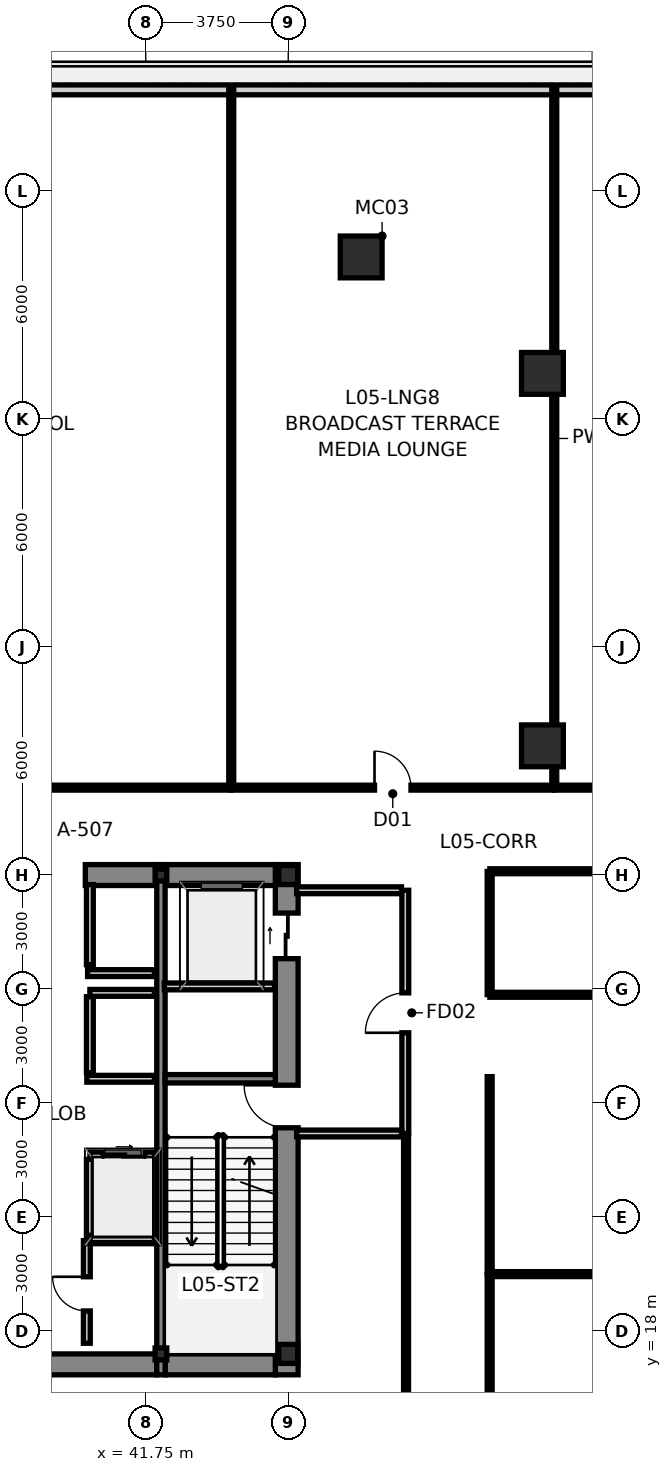
"""IFC4 building model, lengths in metres.
Left out: names, types, materials, properties, quantities, classifications, styles, units other than length and angle.
Written with IfcOpenShell. Run it as: python <this file> out.ifc"""

import sys

from ifc_helpers import new_model, si_unit, direction, frame, frame_2d, origin, origin_2d, place, context, subcontext, project, spatial, rectangle, hollow_rectangle, i_section, extrude, source, transform, mapped, element, fill, save


model = new_model("IFC4")
c1 = context("Model", 3, precision=1e-05, world=origin(), true_north=direction((0.0, 1.0)))
c2 = subcontext(c1, "Body", "Model", "MODEL_VIEW")
j1 = project(units=[si_unit("LENGTHUNIT", "METRE"), si_unit("PLANEANGLEUNIT", "RADIAN")], contexts=[c1])
p1 = place(None, origin())
s1 = spatial("IfcSite", under=j1, at=p1, CompositionType="ELEMENT")
p2 = place(p1, origin())
s2 = spatial("IfcBuilding", under=s1, at=p2, CompositionType="ELEMENT")
p3 = place(p2, frame((0.0, 0.0, 23.1)))
s3 = spatial("IfcBuildingStorey", under=s2, at=p3, CompositionType="ELEMENT", Elevation=23.1)
m1 = source(origin(), c2, "Body", "SweptSolid", [
    extrude(i_section(OverallWidth=0.5, OverallDepth=0.5, WebThickness=0.028, FlangeThickness=0.04, at=origin_2d()), origin(), (0.0, 0.0, 1.0), 4.5),
])
for number, where, z_axis, x_axis in (
    (1, (45.5, 17.4, 0.0), (0.0, 0.0, 1.0), (1.0, 0.0, 0.0)),
    (2, (45.5, 30.0, 0.0), (0.0, 0.0, 1.0), (1.0, 0.0, 0.0)),
):
    element("IfcColumn", number, at=place(p3, frame(where, z_axis=z_axis, x_axis=x_axis)), inside=s3, PredefinedType="COLUMN", context=c2, shape_type="MappedRepresentation", body=[
        mapped(m1, transform((0.0, 0.0, 0.0), scale=1.0)),
    ])
m2 = source(origin(), c2, "Body", "SweptSolid", [
    extrude(i_section(OverallWidth=0.307, OverallDepth=0.315, WebThickness=0.012, FlangeThickness=0.019, at=origin_2d()), origin(), (0.0, 0.0, 1.0), 4.5),
])
for number, where, z_axis, x_axis in (
    (3, (42.15, 17.4, 0.0), (0.0, 0.0, 1.0), (1.0, 0.0, 0.0)),
    (4, (42.15, 30.0, 0.0), (0.0, 0.0, 1.0), (1.0, 0.0, 0.0)),
):
    element("IfcColumn", number, at=place(p3, frame(where, z_axis=z_axis, x_axis=x_axis)), inside=s3, PredefinedType="COLUMN", context=c2, shape_type="MappedRepresentation", body=[
        mapped(m2, transform((0.0, 0.0, 0.0), scale=1.0)),
    ])
p4 = place(p3, frame((45.46, 16.85, 0.0), z_axis=(0.0, 0.0, 1.0), x_axis=(0.0, 1.0, 0.0)))
e5 = element("IfcWall", 5, at=p4, inside=s3, PredefinedType="SHEAR", context=c2, shape_type="SweptSolid", body=[
    extrude(rectangle(XDim=13.425, YDim=0.6, at=frame_2d((6.712, 0.0))), origin(), (0.0, 0.0, 1.0), 4.5),
])
p5 = place(p4, frame((6.5, 0.0, 0.0)))
e6 = element("IfcOpeningElement", 6, at=p5, cuts=e5, PredefinedType="OPENING", context=c2, shape_type="SweptSolid", body=[
    extrude(rectangle(XDim=1.12, YDim=2.15, at=frame_2d((0.56, 1.075))), frame((0.0, 0.312, 0.0), z_axis=(0.0, -1.0, 0.0), x_axis=(1.0, 0.0, 0.0)), (0.0, 0.0, 1.0), 0.624),
])
p6 = place(p4, frame((10.95, 0.0, 0.0)))
e7 = element("IfcOpeningElement", 7, at=p6, cuts=e5, PredefinedType="OPENING", context=c2, shape_type="SweptSolid", body=[
    extrude(rectangle(XDim=1.2, YDim=2.2, at=frame_2d((0.6, 1.1))), frame((0.0, 0.312, 0.0), z_axis=(0.0, -1.0, 0.0), x_axis=(1.0, 0.0, 0.0)), (0.0, 0.0, 1.0), 0.624),
])
p7 = place(p3, frame((33.96, 17.125, 0.0), z_axis=(0.0, 0.0, 1.0), x_axis=(1.0, 0.0, 0.0)))
e8 = element("IfcWall", 8, at=p7, inside=s3, PredefinedType="SHEAR", context=c2, shape_type="SweptSolid", body=[
    extrude(rectangle(XDim=8.08, YDim=0.55, at=frame_2d((4.04, 0.0))), origin(), (0.0, 0.0, 1.0), 4.5),
])
p8 = place(p3, frame((42.26, 17.125, 0.0), z_axis=(0.0, 0.0, 1.0), x_axis=(1.0, 0.0, 0.0)))
e9 = element("IfcWall", 9, at=p8, inside=s3, PredefinedType="SHEAR", context=c2, shape_type="SweptSolid", body=[
    extrude(rectangle(XDim=2.9, YDim=0.55, at=frame_2d((1.45, 0.0))), origin(), (0.0, 0.0, 1.0), 4.5),
])
p9 = place(p3, frame((40.16, 30.0, 0.0), z_axis=(0.0, 0.0, 1.0), x_axis=(1.0, 0.0, 0.0)))
e10 = element("IfcWall", 10, at=p9, inside=s3, PredefinedType="SHEAR", context=c2, shape_type="SweptSolid", body=[
    extrude(rectangle(XDim=1.88, YDim=0.55, at=frame_2d((0.94, 0.0))), origin(), (0.0, 0.0, 1.0), 4.5),
])
p10 = place(p3, frame((42.26, 30.0, 0.0), z_axis=(0.0, 0.0, 1.0), x_axis=(1.0, 0.0, 0.0)))
e11 = element("IfcWall", 11, at=p10, inside=s3, PredefinedType="SHEAR", context=c2, shape_type="SweptSolid", body=[
    extrude(rectangle(XDim=2.9, YDim=0.55, at=frame_2d((1.45, 0.0))), origin(), (0.0, 0.0, 1.0), 4.5),
])
p11 = place(p3, frame((42.15, 16.85, 0.0), z_axis=(0.0, 0.0, 1.0), x_axis=(0.0, 1.0, 0.0)))
e12 = element("IfcWall", 12, at=p11, inside=s3, PredefinedType="SHEAR", context=c2, shape_type="SweptSolid", body=[
    extrude(rectangle(XDim=13.425, YDim=0.22, at=frame_2d((6.712, 0.0))), origin(), (0.0, 0.0, 1.0), 4.5),
])
p12 = place(p3, frame((42.26, 24.64, 0.0), z_axis=(0.0, 0.0, 1.0), x_axis=(1.0, 0.0, 0.0)))
e13 = element("IfcWall", 13, at=p12, inside=s3, PredefinedType="SHEAR", context=c2, shape_type="SweptSolid", body=[
    extrude(rectangle(XDim=2.9, YDim=0.22, at=frame_2d((1.45, 0.0))), origin(), (0.0, 0.0, 1.0), 4.5),
])
m3 = source(origin(), c2, "Body", "SweptSolid", [
    extrude(hollow_rectangle(XDim=1.1, YDim=1.1, WallThickness=0.06, at=origin_2d()), origin(), (0.0, 0.0, 1.0), 4.501),
])
p13 = place(p3, frame((47.419, 46.264, 0.0), z_axis=(-0.023864693146, 0.001735614047, 0.999713691046), x_axis=(-0.072535695779, -0.997365816959, 0.0)))
e14 = element("IfcColumn", 14, at=p13, inside=s3, PredefinedType="COLUMN", context=c2, shape_type="MappedRepresentation", body=[
    mapped(m3, transform((0.0, 0.0, 0.0), scale=1.0)),
])
m4 = source(origin(), c2, "Body", "SweptSolid", [
    extrude(hollow_rectangle(XDim=1.1, YDim=1.1, WallThickness=0.06, at=origin_2d()), origin(), (0.0, 0.0, 1.0), 4.25),
])
for number, where, z_axis, x_axis in (
    (15, (52.189, 33.4, 0.0), (0.0, 0.0, 1.0), (1.0, 0.0, 0.0)),
    (16, (52.189, 43.2, 0.0), (0.0, 0.0, 1.0), (1.0, 0.0, 0.0)),
):
    element("IfcColumn", number, at=place(p3, frame(where, z_axis=z_axis, x_axis=x_axis)), inside=s3, PredefinedType="COLUMN", context=c2, shape_type="MappedRepresentation", body=[
        mapped(m4, transform((0.0, 0.0, 0.0), scale=1.0)),
    ])
p14 = place(p3, frame((13.061, 50.66, 0.0), z_axis=(0.0, 0.0, 1.0), x_axis=(1.0, 0.0, 0.0)))
e17 = element("IfcWall", 17, at=p14, inside=s3, PredefinedType="STANDARD", context=c2, shape_type="SweptSolid", body=[
    extrude(rectangle(XDim=49.878, YDim=0.26, at=frame_2d((24.939, 0.0))), origin(), (0.0, 0.0, 1.0), 4.25),
])
p15 = place(p3, frame((40.28, 22.62, 0.0), z_axis=(0.0, 0.0, 1.0), x_axis=(1.0, 0.0, 0.0)))
e18 = element("IfcWall", 18, at=p15, inside=s3, PredefinedType="PARTITIONING", context=c2, shape_type="SweptSolid", body=[
    extrude(rectangle(XDim=1.7, YDim=0.18, at=frame_2d((0.85, 0.0))), origin(), (0.0, 0.0, 1.0), 4.25),
])
p16 = place(p15, frame((0.35, 0.0, 0.0)))
e19 = element("IfcOpeningElement", 19, at=p16, cuts=e18, PredefinedType="OPENING", context=c2, shape_type="SweptSolid", body=[
    extrude(rectangle(XDim=1.1, YDim=2.2, at=frame_2d((0.55, 1.1))), frame((0.0, 0.102, 0.0), z_axis=(0.0, -1.0, 0.0), x_axis=(1.0, 0.0, 0.0)), (0.0, 0.0, 1.0), 0.204),
])
p17 = place(p3, frame((40.28, 20.52, 0.0), z_axis=(0.0, 0.0, 1.0), x_axis=(0.0, 1.0, 0.0)))
e20 = element("IfcWall", 20, at=p17, inside=s3, PredefinedType="PARTITIONING", context=c2, shape_type="SweptSolid", body=[
    extrude(rectangle(XDim=2.0, YDim=0.18, at=frame_2d((1.0, 0.0))), origin(), (0.0, 0.0, 1.0), 4.25),
])
p18 = place(p3, frame((40.28, 26.9, 0.0), z_axis=(0.0, 0.0, 1.0), x_axis=(1.0, 0.0, 0.0)))
e21 = element("IfcWall", 21, at=p18, inside=s3, PredefinedType="PARTITIONING", context=c2, shape_type="SweptSolid", body=[
    extrude(rectangle(XDim=1.7, YDim=0.18, at=frame_2d((0.85, 0.0))), origin(), (0.0, 0.0, 1.0), 4.25),
])
p19 = place(p3, frame((40.28, 24.8, 0.0), z_axis=(0.0, 0.0, 1.0), x_axis=(0.0, 1.0, 0.0)))
e22 = element("IfcWall", 22, at=p19, inside=s3, PredefinedType="PARTITIONING", context=c2, shape_type="SweptSolid", body=[
    extrude(rectangle(XDim=2.0, YDim=0.18, at=frame_2d((1.0, 0.0))), origin(), (0.0, 0.0, 1.0), 4.25),
])
p20 = place(p3, frame((40.2, 24.64, 0.0), z_axis=(0.0, 0.0, 1.0), x_axis=(1.0, 0.0, 0.0)))
e23 = element("IfcWall", 23, at=p20, inside=s3, PredefinedType="PARTITIONING", context=c2, shape_type="SweptSolid", body=[
    extrude(rectangle(XDim=1.78, YDim=0.18, at=frame_2d((0.89, 0.0))), origin(), (0.0, 0.0, 1.0), 4.25),
])
p21 = place(p3, frame((40.22, 27.42, 0.0), z_axis=(0.0, 0.0, 1.0), x_axis=(1.0, 0.0, 0.0)))
e24 = element("IfcWall", 24, at=p21, inside=s3, PredefinedType="PARTITIONING", context=c2, shape_type="SweptSolid", body=[
    extrude(rectangle(XDim=1.76, YDim=0.18, at=frame_2d((0.88, 0.0))), origin(), (0.0, 0.0, 1.0), 4.25),
])
p22 = place(p3, frame((40.28, 27.64, 0.0), z_axis=(0.0, 0.0, 1.0), x_axis=(0.0, 1.0, 0.0)))
e25 = element("IfcWall", 25, at=p22, inside=s3, PredefinedType="PARTITIONING", context=c2, shape_type="SweptSolid", body=[
    extrude(rectangle(XDim=2.11, YDim=0.18, at=frame_2d((1.055, 0.0))), origin(), (0.0, 0.0, 1.0), 4.25),
])
p23 = place(p3, frame((48.58, 23.2, 0.0), z_axis=(0.0, 0.0, 1.0), x_axis=(0.0, 1.0, 0.0)))
e26 = element("IfcWall", 26, at=p23, inside=s3, PredefinedType="PARTITIONING", context=c2, shape_type="SweptSolid", body=[
    extrude(rectangle(XDim=6.4, YDim=0.18, at=frame_2d((3.2, 0.0))), origin(), (0.0, 0.0, 1.0), 4.25),
])
p24 = place(p23, frame((2.65, 0.0, 0.0)))
e27 = element("IfcOpeningElement", 27, at=p24, cuts=e26, PredefinedType="OPENING", context=c2, shape_type="SweptSolid", body=[
    extrude(rectangle(XDim=1.05, YDim=2.15, at=frame_2d((0.525, 1.075))), frame((0.0, 0.102, 0.0), z_axis=(0.0, -1.0, 0.0), x_axis=(1.0, 0.0, 0.0)), (0.0, 0.0, 1.0), 0.204),
])
p25 = place(p3, frame((45.72, 23.2, 0.0), z_axis=(0.0, 0.0, 1.0), x_axis=(1.0, 0.0, 0.0)))
e28 = element("IfcWall", 28, at=p25, inside=s3, PredefinedType="PARTITIONING", context=c2, shape_type="SweptSolid", body=[
    extrude(rectangle(XDim=2.76, YDim=0.18, at=frame_2d((1.38, 0.0))), origin(), (0.0, 0.0, 1.0), 4.25),
])
p26 = place(p3, frame((45.72, 29.6, 0.0), z_axis=(0.0, 0.0, 1.0), x_axis=(1.0, 0.0, 0.0)))
e29 = element("IfcWall", 29, at=p26, inside=s3, PredefinedType="PARTITIONING", context=c2, shape_type="SweptSolid", body=[
    extrude(rectangle(XDim=2.76, YDim=0.18, at=frame_2d((1.38, 0.0))), origin(), (0.0, 0.0, 1.0), 3.623),
])
p27 = place(p3, frame((42.24, 27.07, 0.0), z_axis=(0.0, 0.0, 1.0), x_axis=(1.0, 0.0, 0.0)))
e30 = element("IfcWall", 30, at=p27, inside=s3, PredefinedType="PARTITIONING", context=c2, shape_type="SweptSolid", body=[
    extrude(rectangle(XDim=2.9, YDim=0.18, at=frame_2d((1.45, 0.0))), origin(), (0.0, 0.0, 1.0), 4.25),
])
p28 = place(p3, frame((40.22, 20.42, 0.0), z_axis=(0.0, 0.0, 1.0), x_axis=(1.0, 0.0, 0.0)))
e31 = element("IfcWall", 31, at=p28, inside=s3, PredefinedType="PARTITIONING", context=c2, shape_type="SweptSolid", body=[
    extrude(rectangle(XDim=1.76, YDim=0.18, at=frame_2d((0.88, 0.0))), origin(), (0.0, 0.0, 1.0), 4.25),
])
p29 = place(p3, frame((40.2, 17.68, 0.0), z_axis=(0.0, 0.0, 1.0), x_axis=(0.0, 1.0, 0.0)))
e32 = element("IfcWall", 32, at=p29, inside=s3, PredefinedType="PARTITIONING", context=c2, shape_type="SweptSolid", body=[
    extrude(rectangle(XDim=2.7, YDim=0.18, at=frame_2d((1.35, 0.0))), origin(), (0.0, 0.0, 1.0), 4.25),
])
p30 = place(p29, frame((0.85, 0.0, 0.0)))
e33 = element("IfcOpeningElement", 33, at=p30, cuts=e32, PredefinedType="OPENING", context=c2, shape_type="SweptSolid", body=[
    extrude(rectangle(XDim=0.9, YDim=2.1, at=frame_2d((0.45, 1.05))), frame((0.0, 0.102, 0.0), z_axis=(0.0, -1.0, 0.0), x_axis=(1.0, 0.0, 0.0)), (0.0, 0.0, 1.0), 0.204),
])
p31 = place(p3, frame((52.5, 32.305, 0.0), z_axis=(0.0, 0.0, 1.0), x_axis=(0.0, 1.0, 0.0)))
e34 = element("IfcWall", 34, at=p31, inside=s3, PredefinedType="PARTITIONING", context=c2, shape_type="SweptSolid", body=[
    extrude(rectangle(XDim=18.365, YDim=0.13, at=frame_2d((9.183, 0.0))), origin(), (0.0, 0.0, 1.0), 2.435),
])
p32 = place(p3, frame((44.0, 32.305, 0.0), z_axis=(0.0, 0.0, 1.0), x_axis=(0.0, 1.0, 0.0)))
e35 = element("IfcWall", 35, at=p32, inside=s3, PredefinedType="PARTITIONING", context=c2, shape_type="SweptSolid", body=[
    extrude(rectangle(XDim=18.365, YDim=0.13, at=frame_2d((9.183, 0.0))), origin(), (0.0, 0.0, 1.0), 4.25),
])
p33 = place(p3, frame((26.205, 32.3, 0.0), z_axis=(0.0, 0.0, 1.0), x_axis=(1.0, 0.0, 0.0)))
e36 = element("IfcWall", 36, at=p33, inside=s3, PredefinedType="PARTITIONING", context=c2, shape_type="SweptSolid", body=[
    extrude(rectangle(XDim=17.79, YDim=0.13, at=frame_2d((8.895, 0.0))), origin(), (0.0, 0.0, 1.0), 4.25),
])
p34 = place(p33, frame((8.415, 0.0, 0.0)))
e37 = element("IfcOpeningElement", 37, at=p34, cuts=e36, PredefinedType="OPENING", context=c2, shape_type="SweptSolid", body=[
    extrude(rectangle(XDim=0.96, YDim=2.15, at=frame_2d((0.48, 1.075))), frame((0.0, 0.077, 0.0), z_axis=(0.0, -1.0, 0.0), x_axis=(1.0, 0.0, 0.0)), (0.0, 0.0, 1.0), 0.154),
])
p35 = place(p3, frame((61.495, 30.1, 0.0), z_axis=(0.0, 0.0, 1.0), x_axis=(-1.0, 0.0, 0.0)))
e38 = element("IfcWall", 38, at=p35, inside=s3, PredefinedType="PARTITIONING", context=c2, shape_type="SweptSolid", body=[
    extrude(rectangle(XDim=10.69, YDim=0.13, at=frame_2d((5.345, 0.0))), origin(), (0.0, 0.0, 1.0), 3.623),
])
p36 = place(p35, frame((5.4, 0.0, 0.0)))
e39 = element("IfcOpeningElement", 39, at=p36, cuts=e38, PredefinedType="OPENING", context=c2, shape_type="SweptSolid", body=[
    extrude(rectangle(XDim=0.96, YDim=2.15, at=frame_2d((0.48, 1.075))), frame((0.0, 0.077, 0.0), z_axis=(0.0, -1.0, 0.0), x_axis=(1.0, 0.0, 0.0)), (0.0, 0.0, 1.0), 0.154),
])
p37 = place(p3, frame((52.505, 32.3, 0.0), z_axis=(0.0, 0.0, 1.0), x_axis=(1.0, 0.0, 0.0)))
e40 = element("IfcWall", 40, at=p37, inside=s3, PredefinedType="PARTITIONING", context=c2, shape_type="SweptSolid", body=[
    extrude(rectangle(XDim=8.99, YDim=0.13, at=frame_2d((4.495, 0.0))), origin(), (0.0, 0.0, 1.0), 4.25),
])
p38 = place(p3, frame((48.6, 14.355, 0.0), z_axis=(0.0, 0.0, 1.0), x_axis=(0.0, 1.0, 0.0)))
e41 = element("IfcWall", 41, at=p38, inside=s3, PredefinedType="PARTITIONING", context=c2, shape_type="SweptSolid", body=[
    extrude(rectangle(XDim=8.75, YDim=0.13, at=frame_2d((4.375, 0.0))), origin(), (0.0, 0.0, 1.0), 4.25),
])
p39 = place(p3, frame((44.005, 32.3, 0.0), z_axis=(0.0, 0.0, 1.0), x_axis=(1.0, 0.0, 0.0)))
e42 = element("IfcWall", 42, at=p39, inside=s3, PredefinedType="PARTITIONING", context=c2, shape_type="SweptSolid", body=[
    extrude(rectangle(XDim=8.49, YDim=0.13, at=frame_2d((4.245, 0.0))), origin(), (0.0, 0.0, 1.0), 4.25),
])
p40 = place(p39, frame((3.765, 0.0, 0.0)))
e43 = element("IfcOpeningElement", 43, at=p40, cuts=e42, PredefinedType="OPENING", context=c2, shape_type="SweptSolid", body=[
    extrude(rectangle(XDim=0.96, YDim=2.15, at=frame_2d((0.48, 1.075))), frame((0.0, 0.077, 0.0), z_axis=(0.0, -1.0, 0.0), x_axis=(1.0, 0.0, 0.0)), (0.0, 0.0, 1.0), 0.154),
])
p41 = place(p3, frame((50.805, 26.85, 0.0), z_axis=(0.0, 0.0, 1.0), x_axis=(1.0, 0.0, 0.0)))
e44 = element("IfcWall", 44, at=p41, inside=s3, PredefinedType="PARTITIONING", context=c2, shape_type="SweptSolid", body=[
    extrude(rectangle(XDim=8.49, YDim=0.13, at=frame_2d((4.245, 0.0))), origin(), (0.0, 0.0, 1.0), 4.25),
])
p42 = place(p3, frame((50.8, 12.205, 0.0), z_axis=(0.0, 0.0, 1.0), x_axis=(0.0, 1.0, 0.0)))
e45 = element("IfcWall", 45, at=p42, inside=s3, PredefinedType="PARTITIONING", context=c2, shape_type="SweptSolid", body=[
    extrude(rectangle(XDim=7.29, YDim=0.13, at=frame_2d((3.645, 0.0))), origin(), (0.0, 0.0, 1.0), 4.25),
])
p43 = place(p42, frame((3.165, 0.0, 0.0)))
e46 = element("IfcOpeningElement", 46, at=p43, cuts=e45, PredefinedType="OPENING", context=c2, shape_type="SweptSolid", body=[
    extrude(rectangle(XDim=0.96, YDim=2.15, at=frame_2d((0.48, 1.075))), frame((0.0, 0.077, 0.0), z_axis=(0.0, -1.0, 0.0), x_axis=(1.0, 0.0, 0.0)), (0.0, 0.0, 1.0), 0.154),
])
p44 = place(p3, frame((50.805, 19.5, 0.0), z_axis=(0.0, 0.0, 1.0), x_axis=(1.0, 0.0, 0.0)))
e47 = element("IfcWall", 47, at=p44, inside=s3, PredefinedType="PARTITIONING", context=c2, shape_type="SweptSolid", body=[
    extrude(rectangle(XDim=5.17, YDim=0.13, at=frame_2d((2.585, 0.0))), origin(), (0.0, 0.0, 1.0), 4.25),
])
p45 = place(p3, frame((50.8, 24.695, 0.0), z_axis=(0.0, 0.0, 1.0), x_axis=(0.0, -1.0, 0.0)))
e48 = element("IfcWall", 48, at=p45, inside=s3, PredefinedType="PARTITIONING", context=c2, shape_type="SweptSolid", body=[
    extrude(rectangle(XDim=5.19, YDim=0.13, at=frame_2d((2.595, 0.0))), origin(), (0.0, 0.0, 1.0), 4.25),
])
p46 = place(p3, frame((50.8, 30.095, 0.0), z_axis=(0.0, 0.0, 1.0), x_axis=(0.0, -1.0, 0.0)))
e49 = element("IfcWall", 49, at=p46, inside=s3, PredefinedType="PARTITIONING", context=c2, shape_type="SweptSolid", body=[
    extrude(rectangle(XDim=3.24, YDim=0.13, at=frame_2d((1.62, 0.0))), origin(), (0.0, 0.0, 1.0), 4.25),
])
p47 = place(p5, origin())
e50 = element("IfcDoor", 50, at=p47, inside=s3, OperationType="SINGLE_SWING_RIGHT", PredefinedType="DOOR", context=c2, shape_type="SweptSolid", body=[
    extrude(rectangle(XDim=1.12, YDim=2.15, at=frame_2d((0.56, 1.075))), frame((0.0, 0.025, 0.0), z_axis=(0.0, -1.0, 0.0), x_axis=(1.0, 0.0, 0.0)), (0.0, 0.0, 1.0), 0.05),
])
fill(e6, e50)
p48 = place(p6, origin())
e51 = element("IfcDoor", 51, at=p48, inside=s3, OperationType="SLIDING_TO_RIGHT", PredefinedType="DOOR", context=c2, shape_type="SweptSolid", body=[
    extrude(rectangle(XDim=1.2, YDim=2.2, at=frame_2d((0.6, 1.1))), frame((0.0, 0.025, 0.0), z_axis=(0.0, -1.0, 0.0), x_axis=(1.0, 0.0, 0.0)), (0.0, 0.0, 1.0), 0.05),
])
fill(e7, e51)
p49 = place(p16, origin())
e52 = element("IfcDoor", 52, at=p49, inside=s3, OperationType="SLIDING_TO_LEFT", PredefinedType="DOOR", context=c2, shape_type="SweptSolid", body=[
    extrude(rectangle(XDim=1.1, YDim=2.2, at=frame_2d((0.55, 1.1))), frame((0.0, 0.025, 0.0), z_axis=(0.0, -1.0, 0.0), x_axis=(1.0, 0.0, 0.0)), (0.0, 0.0, 1.0), 0.05),
])
fill(e19, e52)
p50 = place(p24, origin())
e53 = element("IfcDoor", 53, at=p50, inside=s3, OperationType="SINGLE_SWING_LEFT", PredefinedType="DOOR", context=c2, shape_type="SweptSolid", body=[
    extrude(rectangle(XDim=1.05, YDim=2.15, at=frame_2d((0.525, 1.075))), frame((0.0, 0.025, 0.0), z_axis=(0.0, -1.0, 0.0), x_axis=(1.0, 0.0, 0.0)), (0.0, 0.0, 1.0), 0.05),
])
fill(e27, e53)
p51 = place(p30, origin())
e54 = element("IfcDoor", 54, at=p51, inside=s3, OperationType="SINGLE_SWING_RIGHT", PredefinedType="DOOR", context=c2, shape_type="SweptSolid", body=[
    extrude(rectangle(XDim=0.9, YDim=2.1, at=frame_2d((0.45, 1.05))), frame((0.0, 0.025, 0.0), z_axis=(0.0, -1.0, 0.0), x_axis=(1.0, 0.0, 0.0)), (0.0, 0.0, 1.0), 0.05),
])
fill(e33, e54)
p52 = place(p40, origin())
e55 = element("IfcDoor", 55, at=p52, inside=s3, OperationType="SINGLE_SWING_LEFT", PredefinedType="DOOR", context=c2, shape_type="SweptSolid", body=[
    extrude(rectangle(XDim=0.96, YDim=2.15, at=frame_2d((0.48, 1.075))), frame((0.0, 0.025, 0.0), z_axis=(0.0, -1.0, 0.0), x_axis=(1.0, 0.0, 0.0)), (0.0, 0.0, 1.0), 0.05),
])
fill(e43, e55)
save(model, sys.argv[1])
